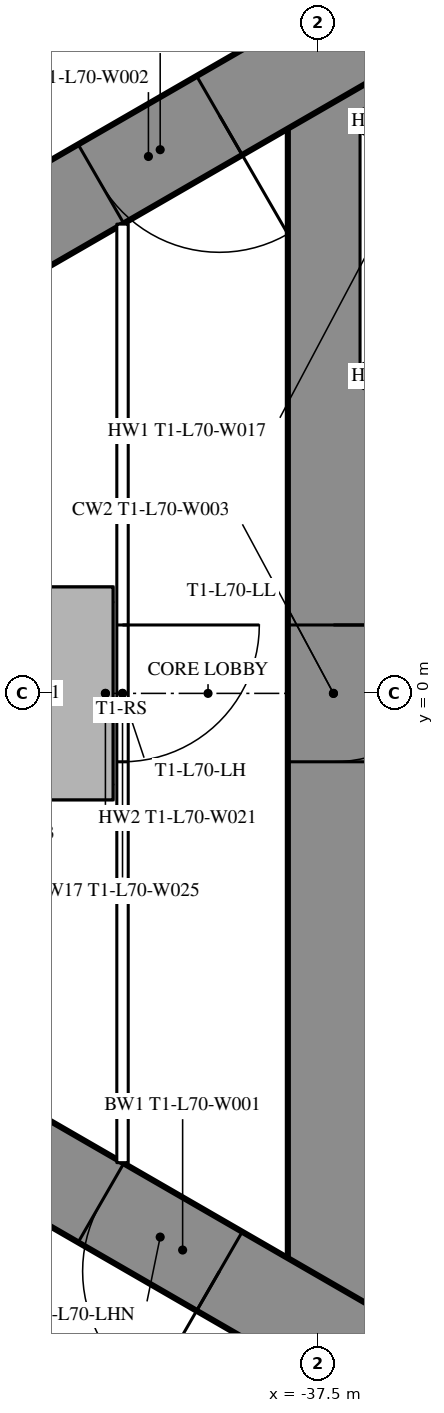
"""IFC4 building model, lengths in metres.
Left out: names, types, materials, properties, quantities, classifications, styles, units other than length and angle.
Written with IfcOpenShell. Run it as: python <this file> out.ifc"""

import sys

from ifc_helpers import new_model, si_unit, direction, frame, frame_2d, origin, origin_2d, place, context, subcontext, project, spatial, rectangle, hollow_circle, extrude, element, fill, save


model = new_model("IFC4")
c1 = context("Model", 3, precision=1e-05, world=origin(), true_north=direction((0.0, 1.0)))
c2 = subcontext(c1, "Body", "Model", "MODEL_VIEW")
j1 = project(units=[si_unit("LENGTHUNIT", "METRE"), si_unit("PLANEANGLEUNIT", "RADIAN")], contexts=[c1])
p1 = place(None, origin())
s1 = spatial("IfcSite", under=j1, at=p1, CompositionType="ELEMENT")
p2 = place(p1, origin())
s2 = spatial("IfcBuilding", under=s1, at=p2, CompositionType="ELEMENT")
p3 = place(p2, frame((0.0, 0.0, 268.3)))
s3 = spatial("IfcBuildingStorey", under=s2, at=p3, CompositionType="ELEMENT", Elevation=268.3)
p4 = place(p3, frame((-37.3, 8.6, 0.0), z_axis=(0.0, 0.0, 1.0), x_axis=(0.0, -1.0, 0.0)))
e1 = element("IfcWall", 1, at=p4, inside=s3, PredefinedType="SHEAR", context=c2, shape_type="SweptSolid", body=[
    extrude(rectangle(XDim=17.2, YDim=1.2, at=frame_2d((8.6, 0.0))), origin(), (0.0, 0.0, 1.0), 5.0),
])
p5 = place(p4, frame((7.7, 0.0, 0.0)))
e2 = element("IfcOpeningElement", 2, at=p5, cuts=e1, PredefinedType="OPENING", context=c2, shape_type="SweptSolid", body=[
    extrude(rectangle(XDim=1.8, YDim=2.2, at=frame_2d((0.9, 1.1))), frame((0.0, 0.61, 0.0), z_axis=(0.0, -1.0, 0.0), x_axis=(1.0, 0.0, 0.0)), (0.0, 0.0, 1.0), 1.22),
])
p6 = place(p3, frame((-27.2, 14.3, 0.0), z_axis=(0.0, 0.0, 1.0), x_axis=(-0.866026593062, -0.499997940104, 0.0)))
e3 = element("IfcWall", 3, at=p6, inside=s3, PredefinedType="SHEAR", context=c2, shape_type="SweptSolid", body=[
    extrude(rectangle(XDim=28.946, YDim=1.2, at=frame_2d((14.473, 0.0))), origin(), (0.0, 0.0, 1.0), 5.0),
])
p7 = place(p6, frame((4.6, 0.0, 0.0)))
e4 = element("IfcOpeningElement", 4, at=p7, cuts=e3, PredefinedType="OPENING", context=c2, shape_type="SweptSolid", body=[
    extrude(rectangle(XDim=1.0, YDim=2.2, at=frame_2d((0.5, 1.1))), frame((0.0, 0.61, 0.0), z_axis=(0.0, -1.0, 0.0), x_axis=(1.0, 0.0, 0.0)), (0.0, 0.0, 1.0), 1.22),
])
p8 = place(p6, frame((13.395, 0.0, 0.0)))
e5 = element("IfcOpeningElement", 5, at=p8, cuts=e3, PredefinedType="OPENING", context=c2, shape_type="SweptSolid", body=[
    extrude(rectangle(XDim=1.8, YDim=2.2, at=frame_2d((0.9, 1.1))), frame((0.0, 0.61, 0.0), z_axis=(0.0, -1.0, 0.0), x_axis=(1.0, 0.0, 0.0)), (0.0, 0.0, 1.0), 1.22),
])
p9 = place(p3, frame((-27.2, -14.3, 0.0), z_axis=(0.0, 0.0, 1.0), x_axis=(-0.866024021859, 0.500002393557, 0.0)))
e6 = element("IfcWall", 6, at=p9, inside=s3, PredefinedType="SHEAR", context=c2, shape_type="SweptSolid", body=[
    extrude(rectangle(XDim=27.907, YDim=1.2, at=frame_2d((13.954, 0.0))), origin(), (0.0, 0.0, 1.0), 5.0),
])
p10 = place(p9, frame((4.6, 0.0, 0.0)))
e7 = element("IfcOpeningElement", 7, at=p10, cuts=e6, PredefinedType="OPENING", context=c2, shape_type="SweptSolid", body=[
    extrude(rectangle(XDim=1.0, YDim=2.2, at=frame_2d((0.5, 1.1))), frame((0.0, 0.61, 0.0), z_axis=(0.0, -1.0, 0.0), x_axis=(1.0, 0.0, 0.0)), (0.0, 0.0, 1.0), 1.22),
])
p11 = place(p9, frame((13.395, 0.0, 0.0)))
e8 = element("IfcOpeningElement", 8, at=p11, cuts=e6, PredefinedType="OPENING", context=c2, shape_type="SweptSolid", body=[
    extrude(rectangle(XDim=1.8, YDim=2.2, at=frame_2d((0.9, 1.1))), frame((0.0, 0.61, 0.0), z_axis=(0.0, -1.0, 0.0), x_axis=(1.0, 0.0, 0.0)), (0.0, 0.0, 1.0), 1.22),
])
for number, where, z_axis, x_axis in (
    (9, (-36.825, 7.525, 5.0), (0.0, 0.0, 1.0), (1.0, 0.0, 0.0)),
    (10, (-36.825, 4.175, 5.0), (0.0, 0.0, 1.0), (1.0, 0.0, 0.0)),
):
    element("IfcColumn", number, at=place(p3, frame(where, z_axis=z_axis, x_axis=x_axis)), inside=s3, PredefinedType="COLUMN", context=c2, shape_type="SweptSolid", body=[
        extrude(hollow_circle(Radius=0.162, WallThickness=0.012, at=origin_2d()), origin(), (0.0, 0.0, 1.0), 3.0),
    ])
p12 = place(p3, frame((-36.825, 7.422, 5.0), z_axis=(0.0, 0.0, 1.0), x_axis=(0.0, -1.0, 0.0)))
e11 = element("IfcWall", 11, at=p12, inside=s3, PredefinedType="SOLIDWALL", context=c2, shape_type="SweptSolid", body=[
    extrude(rectangle(XDim=3.144, YDim=0.25, at=frame_2d((1.572, 0.0))), origin(), (0.0, 0.0, 1.0), 2.54),
])
for number, where, z_axis, x_axis in (
    (12, (-43.8, -1.3, 5.0), (0.0, 0.0, 1.0), (1.0, 0.0, 0.0)),
    (13, (-40.2, 1.3, 5.0), (0.0, 0.0, 1.0), (-1.0, 0.0, 0.0)),
):
    element("IfcWall", number, at=place(p3, frame(where, z_axis=z_axis, x_axis=x_axis)), inside=s3, PredefinedType="SOLIDWALL", context=c2, shape_type="SweptSolid", body=[
        extrude(rectangle(XDim=3.6, YDim=0.2, at=frame_2d((1.8, 0.0))), origin(), (0.0, 0.0, 1.0), 2.6),
    ])
p13 = place(p3, frame((-40.3, -1.2, 5.0), z_axis=(0.0, 0.0, 1.0), x_axis=(0.0, 1.0, 0.0)))
e14 = element("IfcWall", 14, at=p13, inside=s3, PredefinedType="SOLIDWALL", context=c2, shape_type="SweptSolid", body=[
    extrude(rectangle(XDim=2.4, YDim=0.2, at=frame_2d((1.2, 0.0))), origin(), (0.0, 0.0, 1.0), 2.6),
])
p14 = place(p13, frame((0.7, 0.0, 0.0)))
e15 = element("IfcOpeningElement", 15, at=p14, cuts=e14, PredefinedType="OPENING", context=c2, shape_type="SweptSolid", body=[
    extrude(rectangle(XDim=1.0, YDim=2.2, at=frame_2d((0.5, 1.1))), frame((0.0, 0.11, 0.0), z_axis=(0.0, -1.0, 0.0), x_axis=(1.0, 0.0, 0.0)), (0.0, 0.0, 1.0), 0.22),
])
p15 = place(p3, frame((-28.737, 16.068, 0.0), z_axis=(0.0, 0.0, 1.0), x_axis=(-0.866026057212, -0.499998868229, 0.0)))
e16 = element("IfcWall", 16, at=p15, inside=s3, PredefinedType="PARTITIONING", context=c2, shape_type="SweptSolid", body=[
    extrude(rectangle(XDim=32.137, YDim=0.2, at=frame_2d((16.068, 0.0))), origin(), (0.0, 0.0, 1.0), 4.7),
])
p16 = place(p15, frame((7.134, 0.0, 0.0)))
e17 = element("IfcOpeningElement", 17, at=p16, cuts=e16, PredefinedType="OPENING", context=c2, shape_type="SweptSolid", body=[
    extrude(rectangle(XDim=2.0, YDim=2.4, at=frame_2d((1.0, 1.2))), frame((0.0, 0.11, 0.0), z_axis=(0.0, -1.0, 0.0), x_axis=(1.0, 0.0, 0.0)), (0.0, 0.0, 1.0), 0.22),
])
p17 = place(p15, frame((17.117, 0.0, 0.0)))
e18 = element("IfcOpeningElement", 18, at=p17, cuts=e16, PredefinedType="OPENING", context=c2, shape_type="SweptSolid", body=[
    extrude(rectangle(XDim=2.0, YDim=2.4, at=frame_2d((1.0, 1.2))), frame((0.0, 0.11, 0.0), z_axis=(0.0, -1.0, 0.0), x_axis=(1.0, 0.0, 0.0)), (0.0, 0.0, 1.0), 0.22),
])
p18 = place(p15, frame((21.266, 0.0, 0.0)))
e19 = element("IfcOpeningElement", 19, at=p18, cuts=e16, PredefinedType="OPENING", context=c2, shape_type="SweptSolid", body=[
    extrude(rectangle(XDim=2.0, YDim=2.4, at=frame_2d((1.0, 1.2))), frame((0.0, 0.11, 0.0), z_axis=(0.0, -1.0, 0.0), x_axis=(1.0, 0.0, 0.0)), (0.0, 0.0, 1.0), 0.22),
])
p19 = place(p15, frame((27.126, 0.0, 0.0)))
e20 = element("IfcOpeningElement", 20, at=p19, cuts=e16, PredefinedType="OPENING", context=c2, shape_type="SweptSolid", body=[
    extrude(rectangle(XDim=2.0, YDim=2.4, at=frame_2d((1.0, 1.2))), frame((0.0, 0.11, 0.0), z_axis=(0.0, -1.0, 0.0), x_axis=(1.0, 0.0, 0.0)), (0.0, 0.0, 1.0), 0.22),
])
p20 = place(p3, frame((-28.737, -16.068, 0.0), z_axis=(0.0, 0.0, 1.0), x_axis=(-0.866026220747, 0.499998584977, 0.0)))
e21 = element("IfcWall", 21, at=p20, inside=s3, PredefinedType="PARTITIONING", context=c2, shape_type="SweptSolid", body=[
    extrude(rectangle(XDim=32.017, YDim=0.2, at=frame_2d((16.008, 0.0))), origin(), (0.0, 0.0, 1.0), 4.7),
])
p21 = place(p20, frame((27.066, 0.0, 0.0)))
e22 = element("IfcOpeningElement", 22, at=p21, cuts=e21, PredefinedType="OPENING", context=c2, shape_type="SweptSolid", body=[
    extrude(rectangle(XDim=2.0, YDim=2.4, at=frame_2d((1.0, 1.2))), frame((0.0, 0.11, 0.0), z_axis=(0.0, -1.0, 0.0), x_axis=(1.0, 0.0, 0.0)), (0.0, 0.0, 1.0), 0.22),
])
p22 = place(p20, frame((21.266, 0.0, 0.0)))
e23 = element("IfcOpeningElement", 23, at=p22, cuts=e21, PredefinedType="OPENING", context=c2, shape_type="SweptSolid", body=[
    extrude(rectangle(XDim=2.0, YDim=2.4, at=frame_2d((1.0, 1.2))), frame((0.0, 0.11, 0.0), z_axis=(0.0, -1.0, 0.0), x_axis=(1.0, 0.0, 0.0)), (0.0, 0.0, 1.0), 0.22),
])
p23 = place(p20, frame((17.117, 0.0, 0.0)))
e24 = element("IfcOpeningElement", 24, at=p23, cuts=e21, PredefinedType="OPENING", context=c2, shape_type="SweptSolid", body=[
    extrude(rectangle(XDim=2.0, YDim=2.4, at=frame_2d((1.0, 1.2))), frame((0.0, 0.11, 0.0), z_axis=(0.0, -1.0, 0.0), x_axis=(1.0, 0.0, 0.0)), (0.0, 0.0, 1.0), 0.22),
])
p24 = place(p20, frame((7.134, 0.0, 0.0)))
e25 = element("IfcOpeningElement", 25, at=p24, cuts=e21, PredefinedType="OPENING", context=c2, shape_type="SweptSolid", body=[
    extrude(rectangle(XDim=2.0, YDim=2.4, at=frame_2d((1.0, 1.2))), frame((0.0, 0.11, 0.0), z_axis=(0.0, -1.0, 0.0), x_axis=(1.0, 0.0, 0.0)), (0.0, 0.0, 1.0), 0.22),
])
p25 = place(p3, frame((-40.075, 6.174, 0.0), z_axis=(0.0, 0.0, 1.0), x_axis=(0.0, -1.0, 0.0)))
e26 = element("IfcWall", 26, at=p25, inside=s3, PredefinedType="PARTITIONING", context=c2, shape_type="SweptSolid", body=[
    extrude(rectangle(XDim=12.348, YDim=0.15, at=frame_2d((6.174, 0.0))), origin(), (0.0, 0.0, 1.0), 4.7),
])
p26 = place(p25, frame((5.274, 0.0, 0.0)))
e27 = element("IfcOpeningElement", 27, at=p26, cuts=e26, PredefinedType="OPENING", context=c2, shape_type="SweptSolid", body=[
    extrude(rectangle(XDim=1.8, YDim=2.2, at=frame_2d((0.9, 1.1))), frame((0.0, 0.085, 0.0), z_axis=(0.0, -1.0, 0.0), x_axis=(1.0, 0.0, 0.0)), (0.0, 0.0, 1.0), 0.17),
])
p27 = place(p14, origin())
e28 = element("IfcDoor", 28, at=p27, inside=s3, OperationType="SINGLE_SWING_LEFT", PredefinedType="DOOR", context=c2, shape_type="SweptSolid", body=[
    extrude(rectangle(XDim=1.0, YDim=2.2, at=frame_2d((0.5, 1.1))), frame((0.0, 0.025, 0.0), z_axis=(0.0, -1.0, 0.0), x_axis=(1.0, 0.0, 0.0)), (0.0, 0.0, 1.0), 0.05),
])
fill(e15, e28)
p28 = place(p26, origin())
e29 = element("IfcDoor", 29, at=p28, inside=s3, OperationType="DOUBLE_DOOR_SINGLE_SWING", PredefinedType="DOOR", context=c2, shape_type="SweptSolid", body=[
    extrude(rectangle(XDim=1.8, YDim=2.2, at=frame_2d((0.9, 1.1))), frame((0.0, 0.025, 0.0), z_axis=(0.0, -1.0, 0.0), x_axis=(1.0, 0.0, 0.0)), (0.0, 0.0, 1.0), 0.05),
])
fill(e27, e29)
p29 = place(p8, origin())
e30 = element("IfcDoor", 30, at=p29, inside=s3, OperationType="DOUBLE_DOOR_SINGLE_SWING", PredefinedType="DOOR", context=c2, shape_type="SweptSolid", body=[
    extrude(rectangle(XDim=1.8, YDim=2.2, at=frame_2d((0.9, 1.1))), frame((0.0, 0.025, 0.0), z_axis=(0.0, -1.0, 0.0), x_axis=(1.0, 0.0, 0.0)), (0.0, 0.0, 1.0), 0.05),
])
fill(e5, e30)
p30 = place(p11, origin())
e31 = element("IfcDoor", 31, at=p30, inside=s3, OperationType="DOUBLE_DOOR_SINGLE_SWING", PredefinedType="DOOR", context=c2, shape_type="SweptSolid", body=[
    extrude(rectangle(XDim=1.8, YDim=2.2, at=frame_2d((0.9, 1.1))), frame((0.0, 0.025, 0.0), z_axis=(0.0, -1.0, 0.0), x_axis=(1.0, 0.0, 0.0)), (0.0, 0.0, 1.0), 0.05),
])
fill(e8, e31)
p31 = place(p5, origin())
e32 = element("IfcDoor", 32, at=p31, inside=s3, OperationType="DOUBLE_DOOR_SINGLE_SWING", PredefinedType="DOOR", context=c2, shape_type="SweptSolid", body=[
    extrude(rectangle(XDim=1.8, YDim=2.2, at=frame_2d((0.9, 1.1))), frame((0.0, 0.025, 0.0), z_axis=(0.0, -1.0, 0.0), x_axis=(1.0, 0.0, 0.0)), (0.0, 0.0, 1.0), 0.05),
])
fill(e2, e32)
save(model, sys.argv[1])
